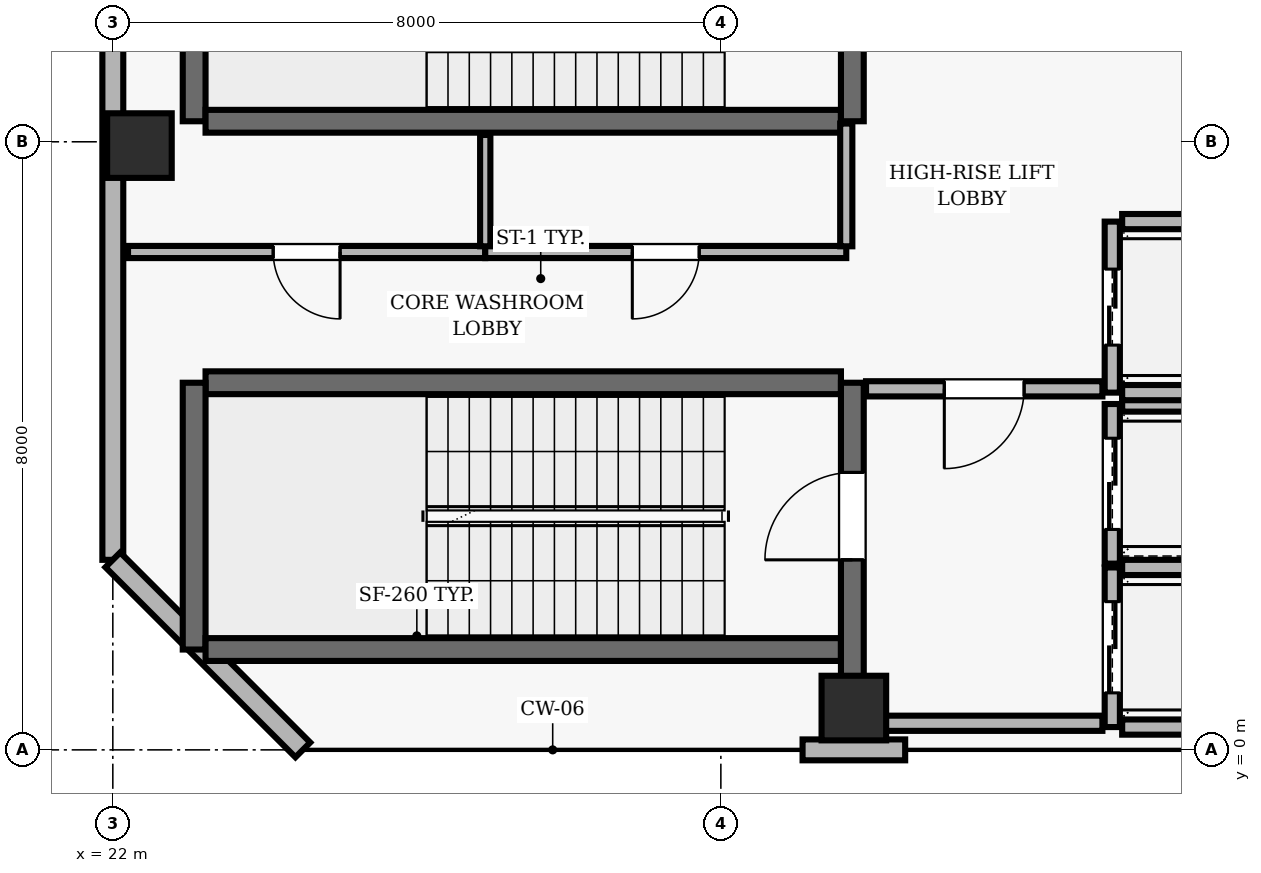
"""IFC4 building model, lengths in metres.
Left out: names, types, materials, properties, quantities, classifications, styles, units other than length and angle.
Written with IfcOpenShell. Run it as: python <this file> out.ifc"""

import sys

from ifc_helpers import new_model, si_unit, direction, frame, frame_2d, origin, origin_2d, place, context, subcontext, project, spatial, rectangle, extrude, element, fill, save


model = new_model("IFC4")
c1 = context("Model", 3, precision=1e-05, world=origin(), true_north=direction((0.0, 1.0)))
c2 = subcontext(c1, "Body", "Model", "MODEL_VIEW")
j1 = project(units=[si_unit("LENGTHUNIT", "METRE"), si_unit("PLANEANGLEUNIT", "RADIAN")], contexts=[c1])
p1 = place(None, origin())
s1 = spatial("IfcSite", under=j1, at=p1, CompositionType="ELEMENT")
p2 = place(p1, origin())
s2 = spatial("IfcBuilding", under=s1, at=p2, CompositionType="ELEMENT")
p3 = place(p2, frame((0.0, 0.0, 306.7)))
s3 = spatial("IfcBuildingStorey", under=s2, at=p3, CompositionType="ELEMENT", Elevation=306.7)
for number, where, z_axis, x_axis in (
    (1, (31.75, 0.55, 0.0), (0.0, 0.0, 1.0), (1.0, 0.0, 0.0)),
    (2, (22.35, 7.95, 0.0), (0.0, 0.0, 1.0), (1.0, 0.0, 0.0)),
):
    element("IfcColumn", number, at=place(p3, frame(where, z_axis=z_axis, x_axis=x_axis)), inside=s3, PredefinedType="COLUMN", context=c2, shape_type="SweptSolid", body=[
        extrude(rectangle(XDim=0.85, YDim=0.85, at=origin_2d()), origin(), (0.0, 0.0, 1.0), 5.0),
    ])
p4 = place(p3, frame((31.075, 0.0, 0.0), z_axis=(0.0, 0.0, 1.0), x_axis=(1.0, 0.0, 0.0)))
e3 = element("IfcWall", 3, at=p4, inside=s3, PredefinedType="SOLIDWALL", context=c2, shape_type="SweptSolid", body=[
    extrude(rectangle(XDim=1.35, YDim=0.275, at=frame_2d((0.675, 0.0))), origin(), (0.0, 0.0, 1.0), 4.74),
])
p5 = place(p3, frame((22.0, 35.3, 0.0), z_axis=(0.0, 0.0, 1.0), x_axis=(0.0, -1.0, 0.0)))
e4 = element("IfcWall", 4, at=p5, inside=s3, PredefinedType="SOLIDWALL", context=c2, shape_type="SweptSolid", body=[
    extrude(rectangle(XDim=32.8, YDim=0.275, at=frame_2d((16.4, 0.0))), origin(), (0.0, 0.0, 1.0), 4.74),
])
p6 = place(p5, frame((7.3, 0.0, 0.0)))
e5 = element("IfcOpeningElement", 5, at=p6, cuts=e4, PredefinedType="OPENING", context=c2, shape_type="SweptSolid", body=[
    extrude(rectangle(XDim=1.0, YDim=2.2, at=frame_2d((0.5, 1.1))), frame((0.0, 0.147, 0.0), z_axis=(0.0, -1.0, 0.0), x_axis=(1.0, 0.0, 0.0)), (0.0, 0.0, 1.0), 0.295),
])
p7 = place(p5, frame((0.783, 0.0, 0.9)))
e6 = element("IfcOpeningElement", 6, at=p7, cuts=e4, PredefinedType="OPENING", context=c2, shape_type="SweptSolid", body=[
    extrude(rectangle(XDim=2.1, YDim=1.6, at=frame_2d((1.05, 0.8))), frame((0.0, 0.147, 0.0), z_axis=(0.0, -1.0, 0.0), x_axis=(1.0, 0.0, 0.0)), (0.0, 0.0, 1.0), 0.295),
])
p8 = place(p5, frame((12.617, 0.0, 0.9)))
e7 = element("IfcOpeningElement", 7, at=p8, cuts=e4, PredefinedType="OPENING", context=c2, shape_type="SweptSolid", body=[
    extrude(rectangle(XDim=2.1, YDim=1.6, at=frame_2d((1.05, 0.8))), frame((0.0, 0.147, 0.0), z_axis=(0.0, -1.0, 0.0), x_axis=(1.0, 0.0, 0.0)), (0.0, 0.0, 1.0), 0.295),
])
p9 = place(p5, frame((17.633, 0.0, 0.9)))
e8 = element("IfcOpeningElement", 8, at=p9, cuts=e4, PredefinedType="OPENING", context=c2, shape_type="SweptSolid", body=[
    extrude(rectangle(XDim=2.1, YDim=1.6, at=frame_2d((1.05, 0.8))), frame((0.0, 0.147, 0.0), z_axis=(0.0, -1.0, 0.0), x_axis=(1.0, 0.0, 0.0)), (0.0, 0.0, 1.0), 0.295),
])
p10 = place(p5, frame((23.55, 0.0, 0.9)))
e9 = element("IfcOpeningElement", 9, at=p10, cuts=e4, PredefinedType="OPENING", context=c2, shape_type="SweptSolid", body=[
    extrude(rectangle(XDim=2.1, YDim=1.6, at=frame_2d((1.05, 0.8))), frame((0.0, 0.147, 0.0), z_axis=(0.0, -1.0, 0.0), x_axis=(1.0, 0.0, 0.0)), (0.0, 0.0, 1.0), 0.295),
])
p11 = place(p3, frame((22.0, 2.5, 0.0), z_axis=(0.0, 0.0, 1.0), x_axis=(0.707106781187, -0.707106781187, 0.0)))
e10 = element("IfcWall", 10, at=p11, inside=s3, PredefinedType="SOLIDWALL", context=c2, shape_type="SweptSolid", body=[
    extrude(rectangle(XDim=3.536, YDim=0.275, at=frame_2d((1.768, 0.0))), origin(), (0.0, 0.0, 1.0), 4.74),
])
p12 = place(p3, frame((31.58, 4.83, 0.0), z_axis=(0.0, 0.0, 1.0), x_axis=(-1.0, 0.0, 0.0)))
e11 = element("IfcWall", 11, at=p12, inside=s3, PredefinedType="SHEAR", context=c2, shape_type="SweptSolid", body=[
    extrude(rectangle(XDim=8.36, YDim=0.3, at=frame_2d((4.18, 0.0))), origin(), (0.0, 0.0, 1.0), 4.74),
])
p13 = place(p3, frame((23.07, 4.83, 0.0), z_axis=(0.0, 0.0, 1.0), x_axis=(0.0, -1.0, 0.0)))
e12 = element("IfcWall", 12, at=p13, inside=s3, PredefinedType="SHEAR", context=c2, shape_type="SweptSolid", body=[
    extrude(rectangle(XDim=3.51, YDim=0.3, at=frame_2d((1.755, 0.0))), origin(), (0.0, 0.0, 1.0), 4.74),
])
p14 = place(p3, frame((23.22, 1.32, 0.0), z_axis=(0.0, 0.0, 1.0), x_axis=(1.0, 0.0, 0.0)))
e13 = element("IfcWall", 13, at=p14, inside=s3, PredefinedType="SHEAR", context=c2, shape_type="SweptSolid", body=[
    extrude(rectangle(XDim=8.36, YDim=0.3, at=frame_2d((4.18, 0.0))), origin(), (0.0, 0.0, 1.0), 4.74),
])
p15 = place(p3, frame((31.73, 0.96, 0.0), z_axis=(0.0, 0.0, 1.0), x_axis=(0.0, 1.0, 0.0)))
e14 = element("IfcWall", 14, at=p15, inside=s3, PredefinedType="SHEAR", context=c2, shape_type="SweptSolid", body=[
    extrude(rectangle(XDim=3.87, YDim=0.3, at=frame_2d((1.935, 0.0))), origin(), (0.0, 0.0, 1.0), 4.74),
])
p16 = place(p15, frame((1.54, 0.0, 0.0)))
e15 = element("IfcOpeningElement", 15, at=p16, cuts=e14, PredefinedType="OPENING", context=c2, shape_type="SweptSolid", body=[
    extrude(rectangle(XDim=1.15, YDim=2.15, at=frame_2d((0.575, 1.075))), frame((0.0, 0.16, 0.0), z_axis=(0.0, -1.0, 0.0), x_axis=(1.0, 0.0, 0.0)), (0.0, 0.0, 1.0), 0.32),
])
p17 = place(p3, frame((23.07, 11.78, 0.0), z_axis=(0.0, 0.0, 1.0), x_axis=(0.0, -1.0, 0.0)))
e16 = element("IfcWall", 16, at=p17, inside=s3, PredefinedType="SHEAR", context=c2, shape_type="SweptSolid", body=[
    extrude(rectangle(XDim=3.51, YDim=0.3, at=frame_2d((1.755, 0.0))), origin(), (0.0, 0.0, 1.0), 4.74),
])
p18 = place(p3, frame((23.22, 8.27, 0.0), z_axis=(0.0, 0.0, 1.0), x_axis=(1.0, 0.0, 0.0)))
e17 = element("IfcWall", 17, at=p18, inside=s3, PredefinedType="SHEAR", context=c2, shape_type="SweptSolid", body=[
    extrude(rectangle(XDim=8.36, YDim=0.3, at=frame_2d((4.18, 0.0))), origin(), (0.0, 0.0, 1.0), 4.74),
])
p19 = place(p3, frame((31.73, 8.27, 0.0), z_axis=(0.0, 0.0, 1.0), x_axis=(0.0, 1.0, 0.0)))
e18 = element("IfcWall", 18, at=p19, inside=s3, PredefinedType="SHEAR", context=c2, shape_type="SweptSolid", body=[
    extrude(rectangle(XDim=3.51, YDim=0.3, at=frame_2d((1.755, 0.0))), origin(), (0.0, 0.0, 1.0), 4.74),
])
p20 = place(p19, frame((1.18, 0.0, 0.0)))
e19 = element("IfcOpeningElement", 19, at=p20, cuts=e18, PredefinedType="OPENING", context=c2, shape_type="SweptSolid", body=[
    extrude(rectangle(XDim=1.15, YDim=2.15, at=frame_2d((0.575, 1.075))), frame((0.0, 0.16, 0.0), z_axis=(0.0, -1.0, 0.0), x_axis=(1.0, 0.0, 0.0)), (0.0, 0.0, 1.0), 0.32),
])
p21 = place(p3, frame((35.15, 2.4, 0.0), z_axis=(0.0, 0.0, 1.0), x_axis=(0.0, -1.0, 0.0)))
e20 = element("IfcWall", 20, at=p21, inside=s3, PredefinedType="SOLIDWALL", context=c2, shape_type="SweptSolid", body=[
    extrude(rectangle(XDim=2.1, YDim=0.2, at=frame_2d((1.05, 0.0))), origin(), (0.0, 0.0, 1.0), 4.74),
])
p22 = place(p21, frame((0.45, 0.0, 0.0)))
e21 = element("IfcOpeningElement", 21, at=p22, cuts=e20, PredefinedType="OPENING", context=c2, shape_type="SweptSolid", body=[
    extrude(rectangle(XDim=1.2, YDim=2.15, at=frame_2d((0.6, 1.075))), frame((0.0, 0.11, 0.0), z_axis=(0.0, -1.0, 0.0), x_axis=(1.0, 0.0, 0.0)), (0.0, 0.0, 1.0), 0.22),
])
for number, where, z_axis, x_axis in (
    (22, (35.28, 0.3, 0.0), (0.0, 0.0, 1.0), (1.0, 0.0, 0.0)),
    (23, (37.42, 2.4, 0.0), (0.0, 0.0, 1.0), (-1.0, 0.0, 0.0)),
):
    element("IfcWall", number, at=place(p3, frame(where, z_axis=z_axis, x_axis=x_axis)), inside=s3, PredefinedType="SOLIDWALL", context=c2, shape_type="SweptSolid", body=[
        extrude(rectangle(XDim=2.14, YDim=0.2, at=frame_2d((1.07, 0.0))), origin(), (0.0, 0.0, 1.0), 4.74),
    ])
p23 = place(p3, frame((35.15, 4.55, 0.0), z_axis=(0.0, 0.0, 1.0), x_axis=(0.0, -1.0, 0.0)))
e24 = element("IfcWall", 24, at=p23, inside=s3, PredefinedType="SOLIDWALL", context=c2, shape_type="SweptSolid", body=[
    extrude(rectangle(XDim=2.1, YDim=0.2, at=frame_2d((1.05, 0.0))), origin(), (0.0, 0.0, 1.0), 4.74),
])
p24 = place(p23, frame((0.45, 0.0, 0.0)))
e25 = element("IfcOpeningElement", 25, at=p24, cuts=e24, PredefinedType="OPENING", context=c2, shape_type="SweptSolid", body=[
    extrude(rectangle(XDim=1.2, YDim=2.15, at=frame_2d((0.6, 1.075))), frame((0.0, 0.11, 0.0), z_axis=(0.0, -1.0, 0.0), x_axis=(1.0, 0.0, 0.0)), (0.0, 0.0, 1.0), 0.22),
])
p25 = place(p3, frame((37.42, 4.55, 0.0), z_axis=(0.0, 0.0, 1.0), x_axis=(-1.0, 0.0, 0.0)))
e26 = element("IfcWall", 26, at=p25, inside=s3, PredefinedType="SOLIDWALL", context=c2, shape_type="SweptSolid", body=[
    extrude(rectangle(XDim=2.14, YDim=0.2, at=frame_2d((1.07, 0.0))), origin(), (0.0, 0.0, 1.0), 4.74),
])
p26 = place(p3, frame((35.15, 6.95, 0.0), z_axis=(0.0, 0.0, 1.0), x_axis=(0.0, -1.0, 0.0)))
e27 = element("IfcWall", 27, at=p26, inside=s3, PredefinedType="SOLIDWALL", context=c2, shape_type="SweptSolid", body=[
    extrude(rectangle(XDim=2.25, YDim=0.2, at=frame_2d((1.125, 0.0))), origin(), (0.0, 0.0, 1.0), 4.74),
])
p27 = place(p26, frame((0.625, 0.0, 0.0)))
e28 = element("IfcOpeningElement", 28, at=p27, cuts=e27, PredefinedType="OPENING", context=c2, shape_type="SweptSolid", body=[
    extrude(rectangle(XDim=1.0, YDim=2.1, at=frame_2d((0.5, 1.05))), frame((0.0, 0.11, 0.0), z_axis=(0.0, -1.0, 0.0), x_axis=(1.0, 0.0, 0.0)), (0.0, 0.0, 1.0), 0.22),
])
for number, where, z_axis, x_axis in (
    (29, (35.28, 4.7, 0.0), (0.0, 0.0, 1.0), (1.0, 0.0, 0.0)),
    (30, (37.42, 6.95, 0.0), (0.0, 0.0, 1.0), (-1.0, 0.0, 0.0)),
):
    element("IfcWall", number, at=place(p3, frame(where, z_axis=z_axis, x_axis=x_axis)), inside=s3, PredefinedType="SOLIDWALL", context=c2, shape_type="SweptSolid", body=[
        extrude(rectangle(XDim=2.14, YDim=0.2, at=frame_2d((1.07, 0.0))), origin(), (0.0, 0.0, 1.0), 4.74),
    ])
p28 = place(p3, frame((26.9, 6.55, 0.0), z_axis=(0.0, 0.0, 1.0), x_axis=(-1.0, 0.0, 0.0)))
e31 = element("IfcWall", 31, at=p28, inside=s3, PredefinedType="PARTITIONING", context=c2, shape_type="SweptSolid", body=[
    extrude(rectangle(XDim=4.7, YDim=0.16, at=frame_2d((2.35, 0.0))), origin(), (0.0, 0.0, 1.0), 4.74),
])
p29 = place(p28, frame((1.91, 0.0, 0.0)))
e32 = element("IfcOpeningElement", 32, at=p29, cuts=e31, PredefinedType="OPENING", context=c2, shape_type="SweptSolid", body=[
    extrude(rectangle(XDim=0.88, YDim=2.1, at=frame_2d((0.44, 1.05))), frame((0.0, 0.09, 0.0), z_axis=(0.0, -1.0, 0.0), x_axis=(1.0, 0.0, 0.0)), (0.0, 0.0, 1.0), 0.18),
])
p30 = place(p3, frame((31.65, 0.35, 0.0), z_axis=(0.0, 0.0, 1.0), x_axis=(1.0, 0.0, 0.0)))
e33 = element("IfcWall", 33, at=p30, inside=s3, PredefinedType="SOLIDWALL", context=c2, shape_type="SweptSolid", body=[
    extrude(rectangle(XDim=3.37, YDim=0.2, at=frame_2d((1.685, 0.0))), origin(), (0.0, 0.0, 1.0), 4.74),
])
p31 = place(p3, frame((31.65, 6.55, 0.0), z_axis=(0.0, 0.0, 1.0), x_axis=(-1.0, 0.0, 0.0)))
e34 = element("IfcWall", 34, at=p31, inside=s3, PredefinedType="PARTITIONING", context=c2, shape_type="SweptSolid", body=[
    extrude(rectangle(XDim=4.75, YDim=0.16, at=frame_2d((2.375, 0.0))), origin(), (0.0, 0.0, 1.0), 4.74),
])
p32 = place(p31, frame((1.935, 0.0, 0.0)))
e35 = element("IfcOpeningElement", 35, at=p32, cuts=e34, PredefinedType="OPENING", context=c2, shape_type="SweptSolid", body=[
    extrude(rectangle(XDim=0.88, YDim=2.1, at=frame_2d((0.44, 1.05))), frame((0.0, 0.09, 0.0), z_axis=(0.0, -1.0, 0.0), x_axis=(1.0, 0.0, 0.0)), (0.0, 0.0, 1.0), 0.18),
])
p33 = place(p3, frame((35.02, 4.75, 0.0), z_axis=(0.0, 0.0, 1.0), x_axis=(-1.0, 0.0, 0.0)))
e36 = element("IfcWall", 36, at=p33, inside=s3, PredefinedType="SOLIDWALL", context=c2, shape_type="SweptSolid", body=[
    extrude(rectangle(XDim=3.11, YDim=0.2, at=frame_2d((1.555, 0.0))), origin(), (0.0, 0.0, 1.0), 4.74),
])
p34 = place(p33, frame((1.03, 0.0, 0.0)))
e37 = element("IfcOpeningElement", 37, at=p34, cuts=e36, PredefinedType="OPENING", context=c2, shape_type="SweptSolid", body=[
    extrude(rectangle(XDim=1.05, YDim=2.15, at=frame_2d((0.525, 1.075))), frame((0.0, 0.11, 0.0), z_axis=(0.0, -1.0, 0.0), x_axis=(1.0, 0.0, 0.0)), (0.0, 0.0, 1.0), 0.22),
])
p35 = place(p3, frame((26.9, 6.625, 0.0), z_axis=(0.0, 0.0, 1.0), x_axis=(0.0, 1.0, 0.0)))
e38 = element("IfcWall", 38, at=p35, inside=s3, PredefinedType="PARTITIONING", context=c2, shape_type="SweptSolid", body=[
    extrude(rectangle(XDim=1.465, YDim=0.135, at=frame_2d((0.732, 0.0))), origin(), (0.0, 0.0, 1.0), 4.74),
])
p36 = place(p3, frame((31.65, 8.24, 0.0), z_axis=(0.0, 0.0, 1.0), x_axis=(0.0, -1.0, 0.0)))
e39 = element("IfcWall", 39, at=p36, inside=s3, PredefinedType="PARTITIONING", context=c2, shape_type="SweptSolid", body=[
    extrude(rectangle(XDim=1.615, YDim=0.16, at=frame_2d((0.808, 0.0))), origin(), (0.0, 0.0, 1.0), 4.74),
])
p37 = place(p16, origin())
e40 = element("IfcDoor", 40, at=p37, inside=s3, OperationType="SINGLE_SWING_LEFT", PredefinedType="DOOR", context=c2, shape_type="SweptSolid", body=[
    extrude(rectangle(XDim=1.15, YDim=2.15, at=frame_2d((0.575, 1.075))), frame((0.0, 0.025, 0.0), z_axis=(0.0, -1.0, 0.0), x_axis=(1.0, 0.0, 0.0)), (0.0, 0.0, 1.0), 0.05),
])
fill(e15, e40)
p38 = place(p22, origin())
e41 = element("IfcDoor", 41, at=p38, inside=s3, OperationType="DOUBLE_DOOR_SLIDING", PredefinedType="DOOR", context=c2, shape_type="SweptSolid", body=[
    extrude(rectangle(XDim=1.2, YDim=2.15, at=frame_2d((0.6, 1.075))), frame((0.0, 0.025, 0.0), z_axis=(0.0, -1.0, 0.0), x_axis=(1.0, 0.0, 0.0)), (0.0, 0.0, 1.0), 0.05),
])
fill(e21, e41)
p39 = place(p24, origin())
e42 = element("IfcDoor", 42, at=p39, inside=s3, OperationType="DOUBLE_DOOR_SLIDING", PredefinedType="DOOR", context=c2, shape_type="SweptSolid", body=[
    extrude(rectangle(XDim=1.2, YDim=2.15, at=frame_2d((0.6, 1.075))), frame((0.0, 0.025, 0.0), z_axis=(0.0, -1.0, 0.0), x_axis=(1.0, 0.0, 0.0)), (0.0, 0.0, 1.0), 0.05),
])
fill(e25, e42)
p40 = place(p27, origin())
e43 = element("IfcDoor", 43, at=p40, inside=s3, OperationType="DOUBLE_DOOR_SLIDING", PredefinedType="DOOR", context=c2, shape_type="SweptSolid", body=[
    extrude(rectangle(XDim=1.0, YDim=2.1, at=frame_2d((0.5, 1.05))), frame((0.0, 0.025, 0.0), z_axis=(0.0, -1.0, 0.0), x_axis=(1.0, 0.0, 0.0)), (0.0, 0.0, 1.0), 0.05),
])
fill(e28, e43)
p41 = place(p34, origin())
e44 = element("IfcDoor", 44, at=p41, inside=s3, OperationType="SINGLE_SWING_RIGHT", PredefinedType="DOOR", context=c2, shape_type="SweptSolid", body=[
    extrude(rectangle(XDim=1.05, YDim=2.15, at=frame_2d((0.525, 1.075))), frame((0.0, 0.025, 0.0), z_axis=(0.0, -1.0, 0.0), x_axis=(1.0, 0.0, 0.0)), (0.0, 0.0, 1.0), 0.05),
])
fill(e37, e44)
p42 = place(p29, origin())
e45 = element("IfcDoor", 45, at=p42, inside=s3, OperationType="SINGLE_SWING_LEFT", PredefinedType="DOOR", context=c2, shape_type="SweptSolid", body=[
    extrude(rectangle(XDim=0.88, YDim=2.1, at=frame_2d((0.44, 1.05))), frame((0.0, 0.025, 0.0), z_axis=(0.0, -1.0, 0.0), x_axis=(1.0, 0.0, 0.0)), (0.0, 0.0, 1.0), 0.05),
])
fill(e32, e45)
p43 = place(p32, origin())
e46 = element("IfcDoor", 46, at=p43, inside=s3, OperationType="SINGLE_SWING_RIGHT", PredefinedType="DOOR", context=c2, shape_type="SweptSolid", body=[
    extrude(rectangle(XDim=0.88, YDim=2.1, at=frame_2d((0.44, 1.05))), frame((0.0, 0.025, 0.0), z_axis=(0.0, -1.0, 0.0), x_axis=(1.0, 0.0, 0.0)), (0.0, 0.0, 1.0), 0.05),
])
fill(e35, e46)
save(model, sys.argv[1])
